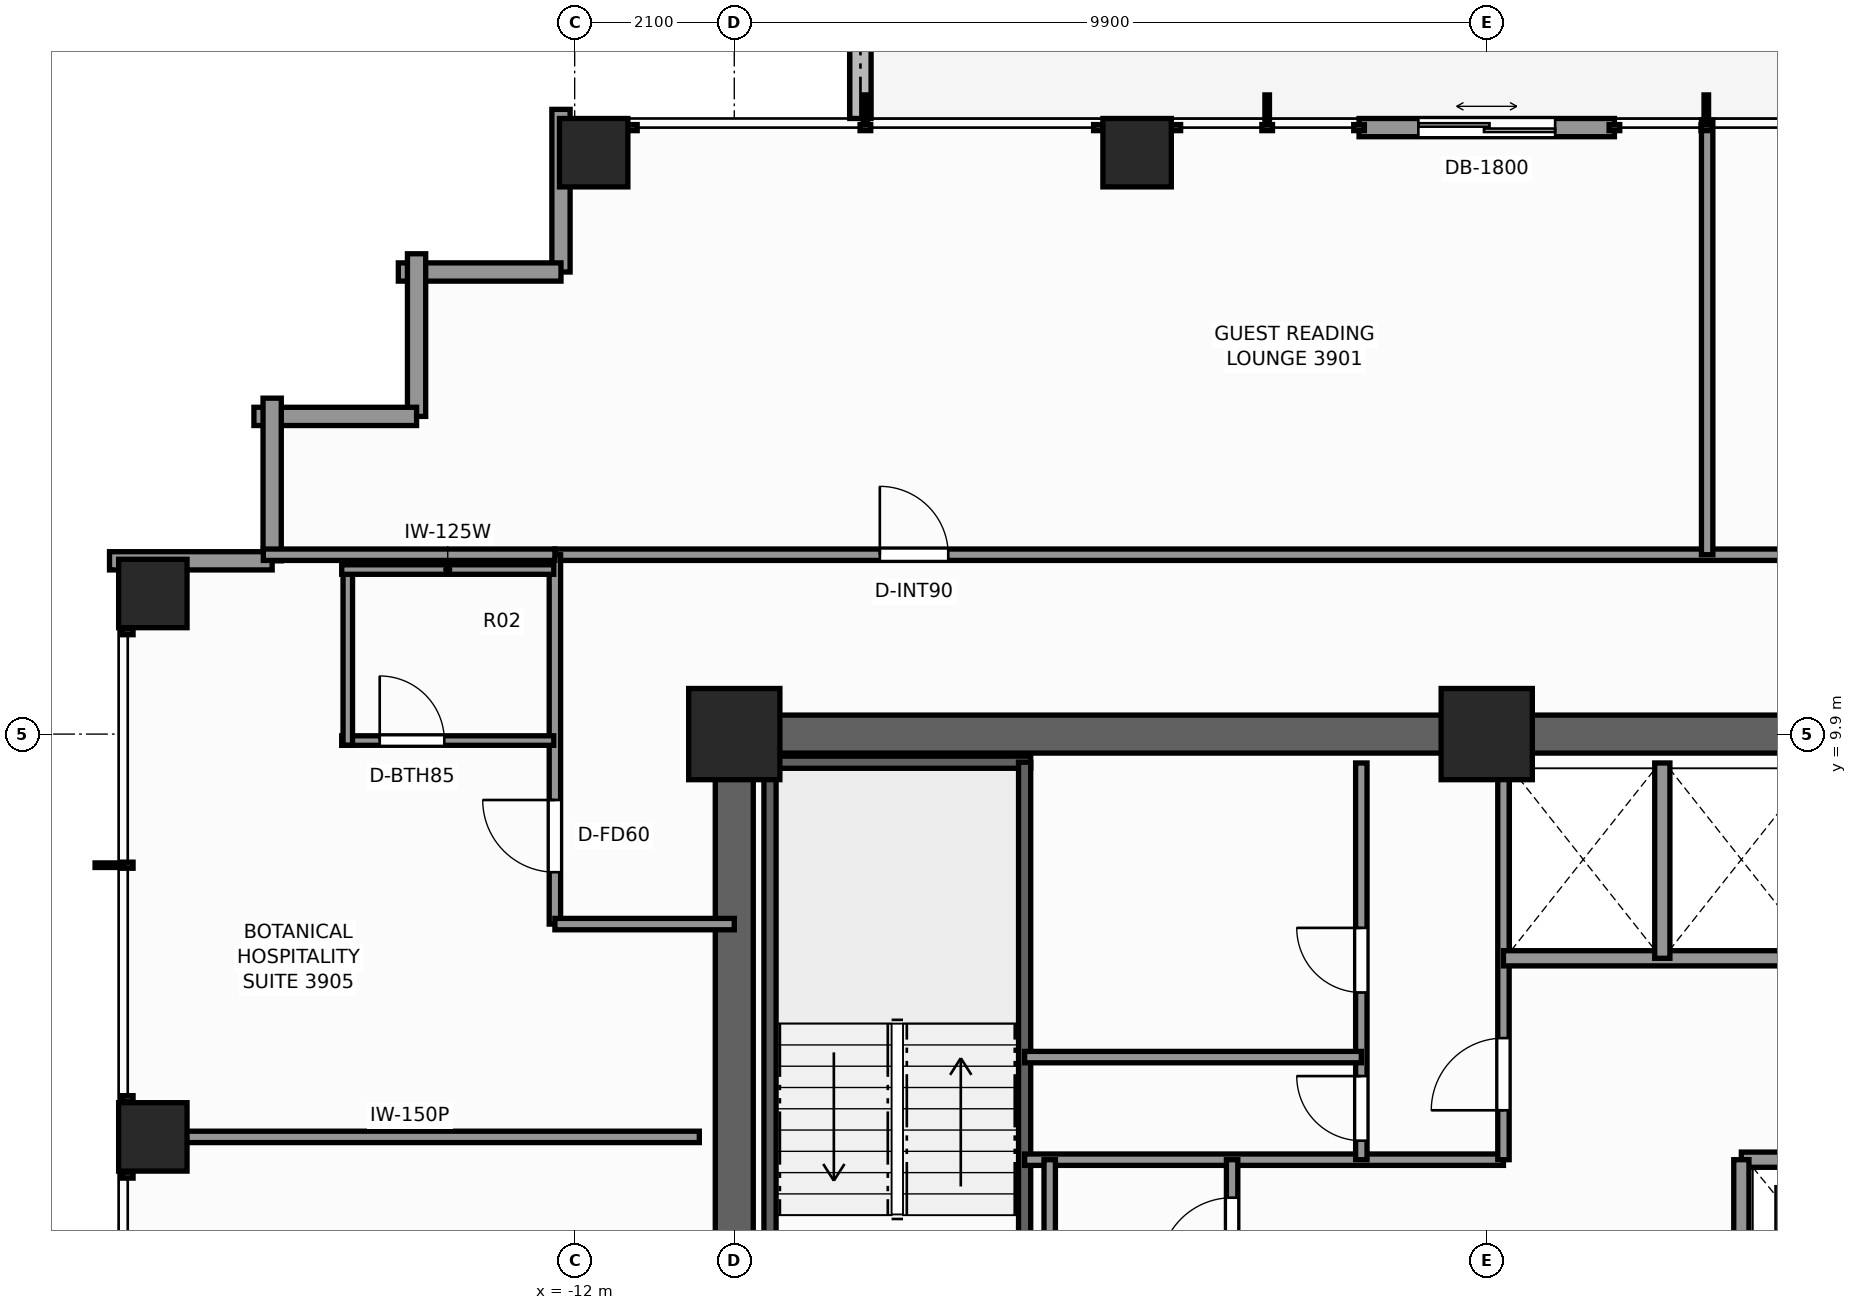
"""IFC4 building model, lengths in metres.
Left out: names, types, materials, properties, quantities, classifications, styles, units other than length and angle.
Written with IfcOpenShell. Run it as: python <this file> out.ifc"""

import sys

from ifc_helpers import new_model, si_unit, direction, frame, frame_2d, origin, origin_2d, place, context, subcontext, project, spatial, rectangle, extrude, element, fill, save


model = new_model("IFC4")
c1 = context("Model", 3, precision=1e-05, world=origin(), true_north=direction((0.0, 1.0)))
c2 = subcontext(c1, "Body", "Model", "MODEL_VIEW")
j1 = project(units=[si_unit("LENGTHUNIT", "METRE"), si_unit("PLANEANGLEUNIT", "RADIAN")], contexts=[c1])
p1 = place(None, origin())
s1 = spatial("IfcSite", under=j1, at=p1, CompositionType="ELEMENT")
p2 = place(p1, origin())
s2 = spatial("IfcBuilding", under=s1, at=p2, CompositionType="ELEMENT")
p3 = place(p2, frame((0.0, 0.0, 134.9)))
s3 = spatial("IfcBuildingStorey", under=s2, at=p3, CompositionType="ELEMENT", Elevation=134.9)
p4 = place(p3, frame((-10.15, 9.9, 0.0), z_axis=(0.0, 0.0, 1.0), x_axis=(1.0, 0.0, 0.0)))
e1 = element("IfcWall", 1, at=p4, inside=s3, PredefinedType="SHEAR", context=c2, shape_type="SweptSolid", body=[
    extrude(rectangle(XDim=14.57, YDim=0.5, at=frame_2d((7.285, 0.0))), origin(), (0.0, 0.0, 1.0), 3.3),
])
p5 = place(p3, frame((-9.9, -3.7, 0.0), z_axis=(0.0, 0.0, 1.0), x_axis=(0.0, 1.0, 0.0)))
e2 = element("IfcWall", 2, at=p5, inside=s3, PredefinedType="SHEAR", context=c2, shape_type="SweptSolid", body=[
    extrude(rectangle(XDim=13.35, YDim=0.5, at=frame_2d((6.675, 0.0))), origin(), (0.0, 0.0, 1.0), 3.3),
])
p6 = place(p5, frame((0.35, 0.0, 0.0)))
e3 = element("IfcOpeningElement", 3, at=p6, cuts=e2, PredefinedType="OPENING", context=c2, shape_type="SweptSolid", body=[
    extrude(rectangle(XDim=1.1, YDim=2.2, at=frame_2d((0.55, 1.1))), frame((0.0, 0.26, 0.0), z_axis=(0.0, -1.0, 0.0), x_axis=(1.0, 0.0, 0.0)), (0.0, 0.0, 1.0), 0.52),
])
for number, where, z_axis, x_axis in (
    (4, (-9.9, 9.9, 0.0), (0.0, 0.0, 1.0), (1.0, 0.0, 0.0)),
    (5, (0.0, 9.9, 0.0), (0.0, 0.0, 1.0), (1.0, 0.0, 0.0)),
):
    element("IfcColumn", number, at=place(p3, frame(where, z_axis=z_axis, x_axis=x_axis)), inside=s3, PredefinedType="COLUMN", context=c2, shape_type="SweptSolid", body=[
        extrude(rectangle(XDim=1.2, YDim=1.2, at=origin_2d()), origin(), (0.0, 0.0, 1.0), 3.3),
    ])
for number, where, z_axis, x_axis in (
    (6, (-11.75, 17.55, 0.0), (0.0, 0.0, 1.0), (1.0, 0.0, 0.0)),
    (7, (-4.6, 17.55, 0.0), (0.0, 0.0, 1.0), (1.0, 0.0, 0.0)),
    (8, (-17.55, 4.6, 0.0), (0.0, 0.0, 1.0), (1.0, 0.0, 0.0)),
    (9, (-17.55, 11.75, 0.0), (0.0, 0.0, 1.0), (1.0, 0.0, 0.0)),
):
    element("IfcColumn", number, at=place(p3, frame(where, z_axis=z_axis, x_axis=x_axis)), inside=s3, PredefinedType="COLUMN", context=c2, shape_type="SweptSolid", body=[
        extrude(rectangle(XDim=0.9, YDim=0.9, at=origin_2d()), origin(), (0.0, 0.0, 1.0), 3.3),
    ])
p7 = place(p3, frame((-8.24, 19.705, -0.02), z_axis=(0.0, 0.0, 1.0), x_axis=(0.0, -1.0, 0.0)))
e10 = element("IfcWall", 10, at=p7, inside=s3, PredefinedType="PARAPET", context=c2, shape_type="SweptSolid", body=[
    extrude(rectangle(XDim=1.705, YDim=0.28, at=frame_2d((0.853, 0.0))), origin(), (0.0, 0.0, 1.0), 0.42),
])
p8 = place(p3, frame((-1.68, 17.88, 0.0), z_axis=(0.0, 0.0, 1.0), x_axis=(1.0, 0.0, 0.0)))
e11 = element("IfcWall", 11, at=p8, inside=s3, PredefinedType="STANDARD", context=c2, shape_type="SweptSolid", body=[
    extrude(rectangle(XDim=3.36, YDim=0.24, at=frame_2d((1.68, 0.0))), origin(), (0.0, 0.0, 1.0), 3.1),
])
p9 = place(p8, frame((0.78, 0.0, 0.0)))
e12 = element("IfcOpeningElement", 12, at=p9, cuts=e11, PredefinedType="OPENING", context=c2, shape_type="SweptSolid", body=[
    extrude(rectangle(XDim=1.8, YDim=2.2, at=frame_2d((0.9, 1.1))), frame((0.0, 0.13, 0.0), z_axis=(0.0, -1.0, 0.0), x_axis=(1.0, 0.0, 0.0)), (0.0, 0.0, 1.0), 0.26),
])
for number, where, z_axis, x_axis in (
    (13, (-12.18, 15.98, 0.0), (0.0, 0.0, 1.0), (0.0, 1.0, 0.0)),
    (14, (-14.32, 15.98, 0.0), (0.0, 0.0, 1.0), (1.0, 0.0, 0.0)),
):
    element("IfcWall", number, at=place(p3, frame(where, z_axis=z_axis, x_axis=x_axis)), inside=s3, PredefinedType="STANDARD", context=c2, shape_type="SweptSolid", body=[
        extrude(rectangle(XDim=2.14, YDim=0.24, at=frame_2d((1.07, 0.0))), origin(), (0.0, 0.0, 1.0), 2.479),
    ])
for number, where, z_axis, x_axis in (
    (15, (-14.08, 14.08, 0.0), (0.0, 0.0, 1.0), (0.0, 1.0, 0.0)),
    (16, (-16.22, 14.08, 0.0), (0.0, 0.0, 1.0), (1.0, 0.0, 0.0)),
):
    element("IfcWall", number, at=place(p3, frame(where, z_axis=z_axis, x_axis=x_axis)), inside=s3, PredefinedType="STANDARD", context=c2, shape_type="SweptSolid", body=[
        extrude(rectangle(XDim=2.14, YDim=0.24, at=frame_2d((1.07, 0.0))), origin(), (0.0, 0.0, 1.0), 2.479),
    ])
for number, where, z_axis, x_axis in (
    (17, (-15.98, 12.18, 0.0), (0.0, 0.0, 1.0), (0.0, 1.0, 0.0)),
    (18, (-18.12, 12.18, 0.0), (0.0, 0.0, 1.0), (1.0, 0.0, 0.0)),
):
    element("IfcWall", number, at=place(p3, frame(where, z_axis=z_axis, x_axis=x_axis)), inside=s3, PredefinedType="STANDARD", context=c2, shape_type="SweptSolid", body=[
        extrude(rectangle(XDim=2.14, YDim=0.24, at=frame_2d((1.07, 0.0))), origin(), (0.0, 0.0, 1.0), 2.479),
    ])
p10 = place(p3, frame((-9.52, 9.53, 0.0), z_axis=(0.0, 0.0, 1.0), x_axis=(1.0, 0.0, 0.0)))
e19 = element("IfcWall", 19, at=p10, inside=s3, PredefinedType="SHEAR", context=c2, shape_type="SweptSolid", body=[
    extrude(rectangle(XDim=3.52, YDim=0.16, at=frame_2d((1.76, 0.0))), origin(), (0.0, 0.0, 1.0), 3.3),
])
for number, where, z_axis, x_axis in (
    (20, (-9.43, 1.97, 0.0), (0.0, 0.0, 1.0), (0.0, 1.0, 0.0)),
    (21, (-6.08, 1.97, 0.0), (0.0, 0.0, 1.0), (0.0, 1.0, 0.0)),
):
    element("IfcWall", number, at=place(p3, frame(where, z_axis=z_axis, x_axis=x_axis)), inside=s3, PredefinedType="SHEAR", context=c2, shape_type="SweptSolid", body=[
        extrude(rectangle(XDim=7.56, YDim=0.16, at=frame_2d((3.78, 0.0))), origin(), (0.0, 0.0, 1.0), 3.3),
    ])
p11 = place(p3, frame((3.35, 4.3, 0.0), z_axis=(0.0, 0.0, 1.0), x_axis=(1.0, 0.0, 0.0)))
e22 = element("IfcWall", 22, at=p11, inside=s3, PredefinedType="SOLIDWALL", context=c2, shape_type="SweptSolid", body=[
    extrude(rectangle(XDim=2.73, YDim=0.2, at=frame_2d((1.365, 0.0))), origin(), (0.0, 0.0, 1.0), 3.1),
])
p12 = place(p11, frame((0.75, 0.0, 0.0)))
e23 = element("IfcOpeningElement", 23, at=p12, cuts=e22, PredefinedType="OPENING", context=c2, shape_type="SweptSolid", body=[
    extrude(rectangle(XDim=1.2, YDim=2.25, at=frame_2d((0.6, 1.125))), frame((0.0, 0.11, 0.0), z_axis=(0.0, -1.0, 0.0), x_axis=(1.0, 0.0, 0.0)), (0.0, 0.0, 1.0), 0.22),
])
p13 = place(p3, frame((3.35, 1.1, 0.0), z_axis=(0.0, 0.0, 1.0), x_axis=(0.0, 1.0, 0.0)))
e24 = element("IfcWall", 24, at=p13, inside=s3, PredefinedType="SOLIDWALL", context=c2, shape_type="SweptSolid", body=[
    extrude(rectangle(XDim=3.2, YDim=0.2, at=frame_2d((1.6, 0.0))), origin(), (0.0, 0.0, 1.0), 2.735),
])
p14 = place(p3, frame((-6.08, 4.3, 0.0), z_axis=(0.0, 0.0, 1.0), x_axis=(1.0, 0.0, 0.0)))
e25 = element("IfcWall", 25, at=p14, inside=s3, PredefinedType="PARTITIONING", context=c2, shape_type="SweptSolid", body=[
    extrude(rectangle(XDim=6.3, YDim=0.15, at=frame_2d((3.15, 0.0))), origin(), (0.0, 0.0, 1.0), 3.1),
])
p15 = place(p3, frame((0.22, 4.3, 0.0), z_axis=(0.0, 0.0, 1.0), x_axis=(0.0, 1.0, 0.0)))
e26 = element("IfcWall", 26, at=p15, inside=s3, PredefinedType="PARTITIONING", context=c2, shape_type="SweptSolid", body=[
    extrude(rectangle(XDim=5.22, YDim=0.15, at=frame_2d((2.61, 0.0))), origin(), (0.0, 0.0, 1.0), 3.1),
])
p16 = place(p15, frame((0.65, 0.0, 0.0)))
e27 = element("IfcOpeningElement", 27, at=p16, cuts=e26, PredefinedType="OPENING", context=c2, shape_type="SweptSolid", body=[
    extrude(rectangle(XDim=0.95, YDim=2.06, at=frame_2d((0.475, 1.03))), frame((0.0, 0.085, 0.0), z_axis=(0.0, -1.0, 0.0), x_axis=(1.0, 0.0, 0.0)), (0.0, 0.0, 1.0), 0.17),
])
p17 = place(p3, frame((-1.65, 4.3, 0.0), z_axis=(0.0, 0.0, 1.0), x_axis=(0.0, 1.0, 0.0)))
e28 = element("IfcWall", 28, at=p17, inside=s3, PredefinedType="PARTITIONING", context=c2, shape_type="SweptSolid", body=[
    extrude(rectangle(XDim=5.22, YDim=0.15, at=frame_2d((2.61, 0.0))), origin(), (0.0, 0.0, 1.0), 3.1),
])
p18 = place(p17, frame((2.2, 0.0, 0.0)))
e29 = element("IfcOpeningElement", 29, at=p18, cuts=e28, PredefinedType="OPENING", context=c2, shape_type="SweptSolid", body=[
    extrude(rectangle(XDim=0.85, YDim=2.03, at=frame_2d((0.425, 1.015))), frame((0.0, 0.085, 0.0), z_axis=(0.0, -1.0, 0.0), x_axis=(1.0, 0.0, 0.0)), (0.0, 0.0, 1.0), 0.17),
])
p19 = place(p17, frame((0.25, 0.0, 0.0)))
e30 = element("IfcOpeningElement", 30, at=p19, cuts=e28, PredefinedType="OPENING", context=c2, shape_type="SweptSolid", body=[
    extrude(rectangle(XDim=0.85, YDim=2.03, at=frame_2d((0.425, 1.015))), frame((0.0, 0.085, 0.0), z_axis=(0.0, -1.0, 0.0), x_axis=(1.0, 0.0, 0.0)), (0.0, 0.0, 1.0), 0.17),
])
p20 = place(p3, frame((-6.08, 5.65, 0.0), z_axis=(0.0, 0.0, 1.0), x_axis=(1.0, 0.0, 0.0)))
e31 = element("IfcWall", 31, at=p20, inside=s3, PredefinedType="PARTITIONING", context=c2, shape_type="SweptSolid", body=[
    extrude(rectangle(XDim=4.43, YDim=0.15, at=frame_2d((2.215, 0.0))), origin(), (0.0, 0.0, 1.0), 3.1),
])
p21 = place(p3, frame((0.22, 6.95, 0.0), z_axis=(0.0, 0.0, 1.0), x_axis=(1.0, 0.0, 0.0)))
e32 = element("IfcWall", 32, at=p21, inside=s3, PredefinedType="SOLIDWALL", context=c2, shape_type="SweptSolid", body=[
    extrude(rectangle(XDim=4.18, YDim=0.2, at=frame_2d((2.09, 0.0))), origin(), (0.0, 0.0, 1.0), 3.1),
])
p22 = place(p3, frame((2.31, 6.95, 0.0), z_axis=(0.0, 0.0, 1.0), x_axis=(0.0, 1.0, 0.0)))
e33 = element("IfcWall", 33, at=p22, inside=s3, PredefinedType="SOLIDWALL", context=c2, shape_type="SweptSolid", body=[
    extrude(rectangle(XDim=2.57, YDim=0.2, at=frame_2d((1.285, 0.0))), origin(), (0.0, 0.0, 1.0), 3.1),
])
p23 = place(p3, frame((-3.35, 1.1, 0.0), z_axis=(0.0, 0.0, 1.0), x_axis=(0.0, 1.0, 0.0)))
e34 = element("IfcWall", 34, at=p23, inside=s3, PredefinedType="PARTITIONING", context=c2, shape_type="SweptSolid", body=[
    extrude(rectangle(XDim=3.2, YDim=0.15, at=frame_2d((1.6, 0.0))), origin(), (0.0, 0.0, 1.0), 2.735),
])
p24 = place(p23, frame((1.75, 0.0, 0.0)))
e35 = element("IfcOpeningElement", 35, at=p24, cuts=e34, PredefinedType="OPENING", context=c2, shape_type="SweptSolid", body=[
    extrude(rectangle(XDim=0.95, YDim=2.06, at=frame_2d((0.475, 1.03))), frame((0.0, 0.085, 0.0), z_axis=(0.0, -1.0, 0.0), x_axis=(1.0, 0.0, 0.0)), (0.0, 0.0, 1.0), 0.17),
])
p25 = place(p3, frame((-5.75, 1.97, 0.0), z_axis=(0.0, 0.0, 1.0), x_axis=(0.0, 1.0, 0.0)))
e36 = element("IfcWall", 36, at=p25, inside=s3, PredefinedType="PARTITIONING", context=c2, shape_type="SweptSolid", body=[
    extrude(rectangle(XDim=2.33, YDim=0.15, at=frame_2d((1.165, 0.0))), origin(), (0.0, 0.0, 1.0), 2.735),
])
p26 = place(p3, frame((-12.26, 12.26, 0.0), z_axis=(0.0, 0.0, 1.0), x_axis=(1.0, 0.0, 0.0)))
e37 = element("IfcWall", 37, at=p26, inside=s3, PredefinedType="PARTITIONING", context=c2, shape_type="SweptSolid", body=[
    extrude(rectangle(XDim=24.68, YDim=0.15, at=frame_2d((12.34, 0.0))), origin(), (0.0, 0.0, 1.0), 2.312),
])
p27 = place(p26, frame((4.275, 0.0, 0.0)))
e38 = element("IfcOpeningElement", 38, at=p27, cuts=e37, PredefinedType="OPENING", context=c2, shape_type="SweptSolid", body=[
    extrude(rectangle(XDim=0.9, YDim=2.06, at=frame_2d((0.45, 1.03))), frame((0.0, 0.085, 0.0), z_axis=(0.0, -1.0, 0.0), x_axis=(1.0, 0.0, 0.0)), (0.0, 0.0, 1.0), 0.17),
])
p28 = place(p26, frame((19.345, 0.0, 0.0)))
e39 = element("IfcOpeningElement", 39, at=p28, cuts=e37, PredefinedType="OPENING", context=c2, shape_type="SweptSolid", body=[
    extrude(rectangle(XDim=0.9, YDim=2.06, at=frame_2d((0.45, 1.03))), frame((0.0, 0.085, 0.0), z_axis=(0.0, -1.0, 0.0), x_axis=(1.0, 0.0, 0.0)), (0.0, 0.0, 1.0), 0.17),
])
p29 = place(p3, frame((-12.26, 7.4, 0.0), z_axis=(0.0, 0.0, 1.0), x_axis=(0.0, 1.0, 0.0)))
e40 = element("IfcWall", 40, at=p29, inside=s3, PredefinedType="PARTITIONING", context=c2, shape_type="SweptSolid", body=[
    extrude(rectangle(XDim=4.86, YDim=0.15, at=frame_2d((2.43, 0.0))), origin(), (0.0, 0.0, 1.0), 2.312),
])
p30 = place(p29, frame((0.683, 0.0, 0.0)))
e41 = element("IfcOpeningElement", 41, at=p30, cuts=e40, PredefinedType="OPENING", context=c2, shape_type="SweptSolid", body=[
    extrude(rectangle(XDim=0.95, YDim=2.06, at=frame_2d((0.475, 1.03))), frame((0.0, 0.085, 0.0), z_axis=(0.0, -1.0, 0.0), x_axis=(1.0, 0.0, 0.0)), (0.0, 0.0, 1.0), 0.17),
])
p31 = place(p3, frame((-12.26, 7.4, 0.0), z_axis=(0.0, 0.0, 1.0), x_axis=(1.0, 0.0, 0.0)))
e42 = element("IfcWall", 42, at=p31, inside=s3, PredefinedType="PARTITIONING", context=c2, shape_type="SweptSolid", body=[
    extrude(rectangle(XDim=2.36, YDim=0.15, at=frame_2d((1.18, 0.0))), origin(), (0.0, 0.0, 1.0), 3.1),
])
p32 = place(p3, frame((-16.096, 12.26, 0.0), z_axis=(0.0, 0.0, 1.0), x_axis=(1.0, 0.0, 0.0)))
e43 = element("IfcWall", 43, at=p32, inside=s3, PredefinedType="PARTITIONING", context=c2, shape_type="SweptSolid", body=[
    extrude(rectangle(XDim=3.836, YDim=0.15, at=frame_2d((1.918, 0.0))), origin(), (0.0, 0.0, 1.0), 3.1),
])
p33 = place(p3, frame((2.9, 12.26, 0.0), z_axis=(0.0, 0.0, 1.0), x_axis=(0.0, 1.0, 0.0)))
e44 = element("IfcWall", 44, at=p33, inside=s3, PredefinedType="PARTITIONING", context=c2, shape_type="SweptSolid", body=[
    extrude(rectangle(XDim=5.72, YDim=0.15, at=frame_2d((2.86, 0.0))), origin(), (0.0, 0.0, 1.0), 2.389),
])
p34 = place(p3, frame((-17.98, 4.6, 0.0), z_axis=(0.0, 0.0, 1.0), x_axis=(1.0, 0.0, 0.0)))
e45 = element("IfcWall", 45, at=p34, inside=s3, PredefinedType="PARTITIONING", context=c2, shape_type="SweptSolid", body=[
    extrude(rectangle(XDim=7.62, YDim=0.15, at=frame_2d((3.81, 0.0))), origin(), (0.0, 0.0, 1.0), 2.312),
])
p35 = place(p3, frame((-15.065, 9.815, 0.0), z_axis=(0.0, 0.0, 1.0), x_axis=(1.0, 0.0, 0.0)))
e46 = element("IfcWall", 46, at=p35, inside=s3, PredefinedType="PARTITIONING", context=c2, shape_type="SweptSolid", body=[
    extrude(rectangle(XDim=2.79, YDim=0.125, at=frame_2d((1.395, 0.0))), origin(), (0.0, 0.0, 1.0), 3.1),
])
p36 = place(p35, frame((0.5, 0.0, 0.0)))
e47 = element("IfcOpeningElement", 47, at=p36, cuts=e46, PredefinedType="OPENING", context=c2, shape_type="SweptSolid", body=[
    extrude(rectangle(XDim=0.85, YDim=2.03, at=frame_2d((0.425, 1.015))), frame((0.0, 0.073, 0.0), z_axis=(0.0, -1.0, 0.0), x_axis=(1.0, 0.0, 0.0)), (0.0, 0.0, 1.0), 0.145),
])
p37 = place(p3, frame((-14.985, 9.755, 0.0), z_axis=(0.0, 0.0, 1.0), x_axis=(0.0, 1.0, 0.0)))
e48 = element("IfcWall", 48, at=p37, inside=s3, PredefinedType="PARTITIONING", context=c2, shape_type="SweptSolid", body=[
    extrude(rectangle(XDim=2.37, YDim=0.125, at=frame_2d((1.185, 0.0))), origin(), (0.0, 0.0, 1.0), 2.312),
])
p38 = place(p3, frame((-15.065, 12.065, 0.0), z_axis=(0.0, 0.0, 1.0), x_axis=(1.0, 0.0, 0.0)))
e49 = element("IfcWall", 49, at=p38, inside=s3, PredefinedType="PARTITIONING", context=c2, shape_type="SweptSolid", body=[
    extrude(rectangle(XDim=2.79, YDim=0.125, at=frame_2d((1.395, 0.0))), origin(), (0.0, 0.0, 1.0), 3.1),
])
p39 = place(p9, origin())
e50 = element("IfcDoor", 50, at=p39, inside=s3, OperationType="DOUBLE_DOOR_SLIDING", PredefinedType="DOOR", context=c2, shape_type="SweptSolid", body=[
    extrude(rectangle(XDim=1.8, YDim=2.2, at=frame_2d((0.9, 1.1))), frame((0.0, 0.025, 0.0), z_axis=(0.0, -1.0, 0.0), x_axis=(1.0, 0.0, 0.0)), (0.0, 0.0, 1.0), 0.05),
])
fill(e12, e50)
p40 = place(p16, origin())
e51 = element("IfcDoor", 51, at=p40, inside=s3, OperationType="SINGLE_SWING_LEFT", PredefinedType="DOOR", context=c2, shape_type="SweptSolid", body=[
    extrude(rectangle(XDim=0.95, YDim=2.06, at=frame_2d((0.475, 1.03))), frame((0.0, 0.025, 0.0), z_axis=(0.0, -1.0, 0.0), x_axis=(1.0, 0.0, 0.0)), (0.0, 0.0, 1.0), 0.05),
])
fill(e27, e51)
p41 = place(p18, origin())
e52 = element("IfcDoor", 52, at=p41, inside=s3, OperationType="SINGLE_SWING_RIGHT", PredefinedType="DOOR", context=c2, shape_type="SweptSolid", body=[
    extrude(rectangle(XDim=0.85, YDim=2.03, at=frame_2d((0.425, 1.015))), frame((0.0, 0.025, 0.0), z_axis=(0.0, -1.0, 0.0), x_axis=(1.0, 0.0, 0.0)), (0.0, 0.0, 1.0), 0.05),
])
fill(e29, e52)
p42 = place(p19, origin())
e53 = element("IfcDoor", 53, at=p42, inside=s3, OperationType="SINGLE_SWING_RIGHT", PredefinedType="DOOR", context=c2, shape_type="SweptSolid", body=[
    extrude(rectangle(XDim=0.85, YDim=2.03, at=frame_2d((0.425, 1.015))), frame((0.0, 0.025, 0.0), z_axis=(0.0, -1.0, 0.0), x_axis=(1.0, 0.0, 0.0)), (0.0, 0.0, 1.0), 0.05),
])
fill(e30, e53)
p43 = place(p24, origin())
e54 = element("IfcDoor", 54, at=p43, inside=s3, OperationType="SINGLE_SWING_LEFT", PredefinedType="DOOR", context=c2, shape_type="SweptSolid", body=[
    extrude(rectangle(XDim=0.95, YDim=2.06, at=frame_2d((0.475, 1.03))), frame((0.0, 0.025, 0.0), z_axis=(0.0, -1.0, 0.0), x_axis=(1.0, 0.0, 0.0)), (0.0, 0.0, 1.0), 0.05),
])
fill(e35, e54)
p44 = place(p27, origin())
e55 = element("IfcDoor", 55, at=p44, inside=s3, OperationType="SINGLE_SWING_LEFT", PredefinedType="DOOR", context=c2, shape_type="SweptSolid", body=[
    extrude(rectangle(XDim=0.9, YDim=2.06, at=frame_2d((0.45, 1.03))), frame((0.0, 0.025, 0.0), z_axis=(0.0, -1.0, 0.0), x_axis=(1.0, 0.0, 0.0)), (0.0, 0.0, 1.0), 0.05),
])
fill(e38, e55)
p45 = place(p36, origin())
e56 = element("IfcDoor", 56, at=p45, inside=s3, OperationType="SINGLE_SWING_LEFT", PredefinedType="DOOR", context=c2, shape_type="SweptSolid", body=[
    extrude(rectangle(XDim=0.85, YDim=2.03, at=frame_2d((0.425, 1.015))), frame((0.0, 0.025, 0.0), z_axis=(0.0, -1.0, 0.0), x_axis=(1.0, 0.0, 0.0)), (0.0, 0.0, 1.0), 0.05),
])
fill(e47, e56)
p46 = place(p30, origin())
e57 = element("IfcDoor", 57, at=p46, inside=s3, OperationType="SINGLE_SWING_RIGHT", PredefinedType="DOOR", context=c2, shape_type="SweptSolid", body=[
    extrude(rectangle(XDim=0.95, YDim=2.06, at=frame_2d((0.475, 1.03))), frame((0.0, 0.025, 0.0), z_axis=(0.0, -1.0, 0.0), x_axis=(1.0, 0.0, 0.0)), (0.0, 0.0, 1.0), 0.05),
])
fill(e41, e57)
save(model, sys.argv[1])
